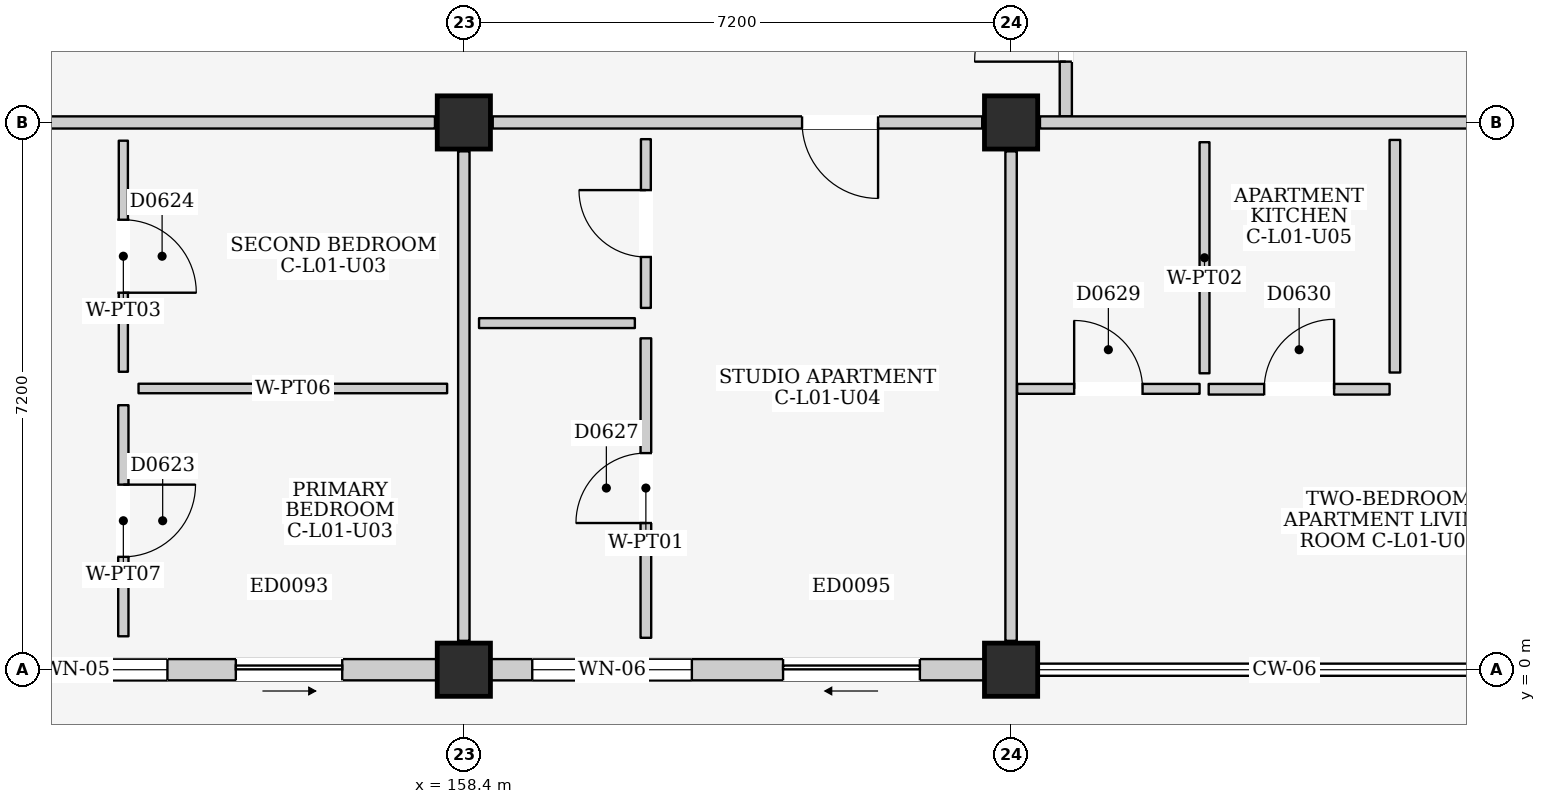
"""IFC4 building model, lengths in metres.
Left out: names, types, materials, properties, quantities, classifications, styles, units other than length and angle.
Written with IfcOpenShell. Run it as: python <this file> out.ifc"""

import sys

from ifc_helpers import new_model, si_unit, direction, frame, frame_2d, origin, origin_2d, place, context, subcontext, project, spatial, rectangle, extrude, element, fill, save


model = new_model("IFC4")
c1 = context("Model", 3, precision=1e-05, world=origin(), true_north=direction((0.0, 1.0)))
c2 = subcontext(c1, "Body", "Model", "MODEL_VIEW")
j1 = project(units=[si_unit("LENGTHUNIT", "METRE"), si_unit("PLANEANGLEUNIT", "RADIAN")], contexts=[c1])
p1 = place(None, origin())
s1 = spatial("IfcSite", under=j1, at=p1, CompositionType="ELEMENT")
p2 = place(p1, origin())
s2 = spatial("IfcBuilding", under=s1, at=p2, CompositionType="ELEMENT")
p3 = place(p2, frame((0.0, 0.0, 4.5)))
s3 = spatial("IfcBuildingStorey", under=s2, at=p3, CompositionType="ELEMENT", Elevation=4.5)
for number, where, z_axis, x_axis in (
    (1, (158.4, 0.0, 0.0), (0.0, 0.0, 1.0), (1.0, 0.0, 0.0)),
    (2, (158.4, 7.2, 0.0), (0.0, 0.0, 1.0), (1.0, 0.0, 0.0)),
    (3, (165.6, 0.0, 0.0), (0.0, 0.0, 1.0), (1.0, 0.0, 0.0)),
    (4, (165.6, 7.2, 0.0), (0.0, 0.0, 1.0), (1.0, 0.0, 0.0)),
):
    element("IfcColumn", number, at=place(p3, frame(where, z_axis=z_axis, x_axis=x_axis)), inside=s3, PredefinedType="COLUMN", context=c2, shape_type="SweptSolid", body=[
        extrude(rectangle(XDim=0.7, YDim=0.7, at=origin_2d()), origin(), (0.0, 0.0, 1.0), 4.5),
    ])
p4 = place(p3, frame((151.55, 0.0, 0.0), z_axis=(0.0, 0.0, 1.0), x_axis=(1.0, 0.0, 0.0)))
e5 = element("IfcWall", 5, at=p4, inside=s3, PredefinedType="ELEMENTEDWALL", context=c2, shape_type="SweptSolid", body=[
    extrude(rectangle(XDim=6.5, YDim=0.28, at=frame_2d((3.25, 0.0))), origin(), (0.0, 0.0, 1.0), 3.715),
])
p5 = place(p4, frame((3.85, 0.0, 0.0)))
e6 = element("IfcOpeningElement", 6, at=p5, cuts=e5, PredefinedType="OPENING", context=c2, shape_type="SweptSolid", body=[
    extrude(rectangle(XDim=1.4, YDim=2.1, at=frame_2d((0.7, 1.05))), frame((0.0, 0.155, 0.0), z_axis=(0.0, -1.0, 0.0), x_axis=(1.0, 0.0, 0.0)), (0.0, 0.0, 1.0), 0.31),
])
p6 = place(p4, frame((0.55, 0.0, 0.9)))
e7 = element("IfcOpeningElement", 7, at=p6, cuts=e5, PredefinedType="OPENING", context=c2, shape_type="SweptSolid", body=[
    extrude(rectangle(XDim=2.4, YDim=1.65, at=frame_2d((1.2, 0.825))), frame((0.0, 0.155, 0.0), z_axis=(0.0, -1.0, 0.0), x_axis=(1.0, 0.0, 0.0)), (0.0, 0.0, 1.0), 0.31),
])
p7 = place(p3, frame((158.75, 0.0, 0.0), z_axis=(0.0, 0.0, 1.0), x_axis=(1.0, 0.0, 0.0)))
e8 = element("IfcWall", 8, at=p7, inside=s3, PredefinedType="ELEMENTEDWALL", context=c2, shape_type="SweptSolid", body=[
    extrude(rectangle(XDim=6.5, YDim=0.28, at=frame_2d((3.25, 0.0))), origin(), (0.0, 0.0, 1.0), 3.715),
])
p8 = place(p7, frame((3.85, 0.0, 0.0)))
e9 = element("IfcOpeningElement", 9, at=p8, cuts=e8, PredefinedType="OPENING", context=c2, shape_type="SweptSolid", body=[
    extrude(rectangle(XDim=1.8, YDim=2.12, at=frame_2d((0.9, 1.06))), frame((0.0, 0.155, 0.0), z_axis=(0.0, -1.0, 0.0), x_axis=(1.0, 0.0, 0.0)), (0.0, 0.0, 1.0), 0.31),
])
p9 = place(p7, frame((0.55, 0.0, 0.9)))
e10 = element("IfcOpeningElement", 10, at=p9, cuts=e8, PredefinedType="OPENING", context=c2, shape_type="SweptSolid", body=[
    extrude(rectangle(XDim=2.1, YDim=1.65, at=frame_2d((1.05, 0.825))), frame((0.0, 0.155, 0.0), z_axis=(0.0, -1.0, 0.0), x_axis=(1.0, 0.0, 0.0)), (0.0, 0.0, 1.0), 0.31),
])
p10 = place(p3, frame((166.32, 7.28, 0.0), z_axis=(0.0, 0.0, 1.0), x_axis=(0.0, 1.0, 0.0)))
e11 = element("IfcWall", 11, at=p10, inside=s3, PredefinedType="PARTITIONING", context=c2, shape_type="SweptSolid", body=[
    extrude(rectangle(XDim=4.32, YDim=0.16, at=frame_2d((2.16, 0.0))), origin(), (0.0, 0.0, 1.0), 4.25),
])
p11 = place(p10, frame((0.72, 0.0, 0.0)))
e12 = element("IfcOpeningElement", 12, at=p11, cuts=e11, PredefinedType="OPENING", context=c2, shape_type="SweptSolid", body=[
    extrude(rectangle(XDim=1.2, YDim=2.2, at=frame_2d((0.6, 1.1))), frame((0.0, 0.095, 0.0), z_axis=(0.0, -1.0, 0.0), x_axis=(1.0, 0.0, 0.0)), (0.0, 0.0, 1.0), 0.19),
])
p12 = place(p3, frame((151.58, 7.2, 0.0), z_axis=(0.0, 0.0, 1.0), x_axis=(1.0, 0.0, 0.0)))
e13 = element("IfcWall", 13, at=p12, inside=s3, PredefinedType="PARTITIONING", context=c2, shape_type="SweptSolid", body=[
    extrude(rectangle(XDim=6.44, YDim=0.16, at=frame_2d((3.22, 0.0))), origin(), (0.0, 0.0, 1.0), 3.635),
])
p13 = place(p12, frame((0.18, 0.0, 0.0)))
e14 = element("IfcOpeningElement", 14, at=p13, cuts=e13, PredefinedType="OPENING", context=c2, shape_type="SweptSolid", body=[
    extrude(rectangle(XDim=1.0, YDim=2.15, at=frame_2d((0.5, 1.075))), frame((0.0, 0.095, 0.0), z_axis=(0.0, -1.0, 0.0), x_axis=(1.0, 0.0, 0.0)), (0.0, 0.0, 1.0), 0.19),
])
p14 = place(p3, frame((158.4, 0.38, 0.0), z_axis=(0.0, 0.0, 1.0), x_axis=(0.0, 1.0, 0.0)))
e15 = element("IfcWall", 15, at=p14, inside=s3, PredefinedType="PARTITIONING", context=c2, shape_type="SweptSolid", body=[
    extrude(rectangle(XDim=6.44, YDim=0.15, at=frame_2d((3.22, 0.0))), origin(), (0.0, 0.0, 1.0), 3.685),
])
p15 = place(p3, frame((153.92, 0.44, 0.0), z_axis=(0.0, 0.0, 1.0), x_axis=(0.0, 1.0, 0.0)))
e16 = element("IfcWall", 16, at=p15, inside=s3, PredefinedType="PARTITIONING", context=c2, shape_type="SweptSolid", body=[
    extrude(rectangle(XDim=3.04, YDim=0.135, at=frame_2d((1.52, 0.0))), origin(), (0.0, 0.0, 1.0), 4.25),
])
p16 = place(p15, frame((1.045, 0.0, 0.0)))
e17 = element("IfcOpeningElement", 17, at=p16, cuts=e16, PredefinedType="OPENING", context=c2, shape_type="SweptSolid", body=[
    extrude(rectangle(XDim=0.95, YDim=2.15, at=frame_2d((0.475, 1.075))), frame((0.0, 0.083, 0.0), z_axis=(0.0, -1.0, 0.0), x_axis=(1.0, 0.0, 0.0)), (0.0, 0.0, 1.0), 0.165),
])
p17 = place(p3, frame((154.12, 3.7, 0.0), z_axis=(0.0, 0.0, 1.0), x_axis=(1.0, 0.0, 0.0)))
e18 = element("IfcWall", 18, at=p17, inside=s3, PredefinedType="PARTITIONING", context=c2, shape_type="SweptSolid", body=[
    extrude(rectangle(XDim=4.06, YDim=0.125, at=frame_2d((2.03, 0.0))), origin(), (0.0, 0.0, 1.0), 4.25),
])
p18 = place(p3, frame((153.92, 3.92, 0.0), z_axis=(0.0, 0.0, 1.0), x_axis=(0.0, 1.0, 0.0)))
e19 = element("IfcWall", 19, at=p18, inside=s3, PredefinedType="PARTITIONING", context=c2, shape_type="SweptSolid", body=[
    extrude(rectangle(XDim=3.04, YDim=0.12, at=frame_2d((1.52, 0.0))), origin(), (0.0, 0.0, 1.0), 4.25),
])
p19 = place(p18, frame((1.04, 0.0, 0.0)))
e20 = element("IfcOpeningElement", 20, at=p19, cuts=e19, PredefinedType="OPENING", context=c2, shape_type="SweptSolid", body=[
    extrude(rectangle(XDim=0.96, YDim=2.15, at=frame_2d((0.48, 1.075))), frame((0.0, 0.075, 0.0), z_axis=(0.0, -1.0, 0.0), x_axis=(1.0, 0.0, 0.0)), (0.0, 0.0, 1.0), 0.15),
])
p20 = place(p3, frame((158.78, 7.2, 0.0), z_axis=(0.0, 0.0, 1.0), x_axis=(1.0, 0.0, 0.0)))
e21 = element("IfcWall", 21, at=p20, inside=s3, PredefinedType="PARTITIONING", context=c2, shape_type="SweptSolid", body=[
    extrude(rectangle(XDim=6.44, YDim=0.16, at=frame_2d((3.22, 0.0))), origin(), (0.0, 0.0, 1.0), 3.635),
])
p21 = place(p20, frame((4.07, 0.0, 0.0)))
e22 = element("IfcOpeningElement", 22, at=p21, cuts=e21, PredefinedType="OPENING", context=c2, shape_type="SweptSolid", body=[
    extrude(rectangle(XDim=1.0, YDim=2.15, at=frame_2d((0.5, 1.075))), frame((0.0, 0.095, 0.0), z_axis=(0.0, -1.0, 0.0), x_axis=(1.0, 0.0, 0.0)), (0.0, 0.0, 1.0), 0.19),
])
p22 = place(p3, frame((165.6, 0.38, 0.0), z_axis=(0.0, 0.0, 1.0), x_axis=(0.0, 1.0, 0.0)))
e23 = element("IfcWall", 23, at=p22, inside=s3, PredefinedType="PARTITIONING", context=c2, shape_type="SweptSolid", body=[
    extrude(rectangle(XDim=6.44, YDim=0.15, at=frame_2d((3.22, 0.0))), origin(), (0.0, 0.0, 1.0), 3.685),
])
p23 = place(p3, frame((158.6, 4.56, 0.0), z_axis=(0.0, 0.0, 1.0), x_axis=(1.0, 0.0, 0.0)))
e24 = element("IfcWall", 24, at=p23, inside=s3, PredefinedType="PARTITIONING", context=c2, shape_type="SweptSolid", body=[
    extrude(rectangle(XDim=2.05, YDim=0.13, at=frame_2d((1.025, 0.0))), origin(), (0.0, 0.0, 1.0), 4.25),
])
p24 = place(p3, frame((160.795, 4.76, 0.0), z_axis=(0.0, 0.0, 1.0), x_axis=(0.0, 1.0, 0.0)))
e25 = element("IfcWall", 25, at=p24, inside=s3, PredefinedType="PARTITIONING", context=c2, shape_type="SweptSolid", body=[
    extrude(rectangle(XDim=2.22, YDim=0.13, at=frame_2d((1.11, 0.0))), origin(), (0.0, 0.0, 1.0), 4.25),
])
p25 = place(p24, frame((0.67, 0.0, 0.0)))
e26 = element("IfcOpeningElement", 26, at=p25, cuts=e25, PredefinedType="OPENING", context=c2, shape_type="SweptSolid", body=[
    extrude(rectangle(XDim=0.88, YDim=2.1, at=frame_2d((0.44, 1.05))), frame((0.0, 0.08, 0.0), z_axis=(0.0, -1.0, 0.0), x_axis=(1.0, 0.0, 0.0)), (0.0, 0.0, 1.0), 0.16),
])
p26 = place(p3, frame((160.795, 0.42, 0.0), z_axis=(0.0, 0.0, 1.0), x_axis=(0.0, 1.0, 0.0)))
e27 = element("IfcWall", 27, at=p26, inside=s3, PredefinedType="PARTITIONING", context=c2, shape_type="SweptSolid", body=[
    extrude(rectangle(XDim=3.94, YDim=0.14, at=frame_2d((1.97, 0.0))), origin(), (0.0, 0.0, 1.0), 4.25),
])
p27 = place(p26, frame((1.51, 0.0, 0.0)))
e28 = element("IfcOpeningElement", 28, at=p27, cuts=e27, PredefinedType="OPENING", context=c2, shape_type="SweptSolid", body=[
    extrude(rectangle(XDim=0.92, YDim=2.1, at=frame_2d((0.46, 1.05))), frame((0.0, 0.085, 0.0), z_axis=(0.0, -1.0, 0.0), x_axis=(1.0, 0.0, 0.0)), (0.0, 0.0, 1.0), 0.17),
])
p28 = place(p3, frame((165.98, 7.2, 0.0), z_axis=(0.0, 0.0, 1.0), x_axis=(1.0, 0.0, 0.0)))
e29 = element("IfcWall", 29, at=p28, inside=s3, PredefinedType="PARTITIONING", context=c2, shape_type="SweptSolid", body=[
    extrude(rectangle(XDim=6.44, YDim=0.16, at=frame_2d((3.22, 0.0))), origin(), (0.0, 0.0, 1.0), 3.635),
])
p29 = place(p3, frame((165.68, 3.695, 0.0), z_axis=(0.0, 0.0, 1.0), x_axis=(1.0, 0.0, 0.0)))
e30 = element("IfcWall", 30, at=p29, inside=s3, PredefinedType="PARTITIONING", context=c2, shape_type="SweptSolid", body=[
    extrude(rectangle(XDim=2.4, YDim=0.13, at=frame_2d((1.2, 0.0))), origin(), (0.0, 0.0, 1.0), 4.25),
])
p30 = place(p29, frame((0.75, 0.0, 0.0)))
e31 = element("IfcOpeningElement", 31, at=p30, cuts=e30, PredefinedType="OPENING", context=c2, shape_type="SweptSolid", body=[
    extrude(rectangle(XDim=0.9, YDim=2.1, at=frame_2d((0.45, 1.05))), frame((0.0, 0.08, 0.0), z_axis=(0.0, -1.0, 0.0), x_axis=(1.0, 0.0, 0.0)), (0.0, 0.0, 1.0), 0.16),
])
p31 = place(p3, frame((168.145, 3.9, 0.0), z_axis=(0.0, 0.0, 1.0), x_axis=(0.0, 1.0, 0.0)))
e32 = element("IfcWall", 32, at=p31, inside=s3, PredefinedType="PARTITIONING", context=c2, shape_type="SweptSolid", body=[
    extrude(rectangle(XDim=3.04, YDim=0.13, at=frame_2d((1.52, 0.0))), origin(), (0.0, 0.0, 1.0), 4.25),
])
p32 = place(p3, frame((168.2, 3.69, 0.0), z_axis=(0.0, 0.0, 1.0), x_axis=(1.0, 0.0, 0.0)))
e33 = element("IfcWall", 33, at=p32, inside=s3, PredefinedType="PARTITIONING", context=c2, shape_type="SweptSolid", body=[
    extrude(rectangle(XDim=2.38, YDim=0.14, at=frame_2d((1.19, 0.0))), origin(), (0.0, 0.0, 1.0), 4.25),
])
p33 = place(p32, frame((0.73, 0.0, 0.0)))
e34 = element("IfcOpeningElement", 34, at=p33, cuts=e33, PredefinedType="OPENING", context=c2, shape_type="SweptSolid", body=[
    extrude(rectangle(XDim=0.92, YDim=2.1, at=frame_2d((0.46, 1.05))), frame((0.0, 0.085, 0.0), z_axis=(0.0, -1.0, 0.0), x_axis=(1.0, 0.0, 0.0)), (0.0, 0.0, 1.0), 0.17),
])
p34 = place(p3, frame((170.65, 3.91, 0.0), z_axis=(0.0, 0.0, 1.0), x_axis=(0.0, 1.0, 0.0)))
e35 = element("IfcWall", 35, at=p34, inside=s3, PredefinedType="PARTITIONING", context=c2, shape_type="SweptSolid", body=[
    extrude(rectangle(XDim=3.06, YDim=0.14, at=frame_2d((1.53, 0.0))), origin(), (0.0, 0.0, 1.0), 4.25),
])
p35 = place(p5, frame((1.4, 0.0, 0.0), z_axis=(0.0, 0.0, 1.0), x_axis=(-1.0, 0.0, 0.0)))
e36 = element("IfcDoor", 36, at=p35, inside=s3, OperationType="SLIDING_TO_RIGHT", PredefinedType="DOOR", context=c2, shape_type="SweptSolid", body=[
    extrude(rectangle(XDim=1.4, YDim=2.1, at=frame_2d((0.7, 1.05))), frame((0.0, 0.025, 0.0), z_axis=(0.0, -1.0, 0.0), x_axis=(1.0, 0.0, 0.0)), (0.0, 0.0, 1.0), 0.05),
])
fill(e6, e36)
p36 = place(p6, origin())
e37 = element("IfcWindow", 37, at=p36, inside=s3, PartitioningType="TRIPLE_PANEL_VERTICAL", PredefinedType="WINDOW", context=c2, shape_type="SweptSolid", body=[
    extrude(rectangle(XDim=2.4, YDim=1.65, at=frame_2d((1.2, 0.825))), frame((0.0, 0.03, 0.0), z_axis=(0.0, -1.0, 0.0), x_axis=(1.0, 0.0, 0.0)), (0.0, 0.0, 1.0), 0.06),
])
fill(e7, e37)
p37 = place(p8, frame((1.8, 0.0, 0.0), z_axis=(0.0, 0.0, 1.0), x_axis=(-1.0, 0.0, 0.0)))
e38 = element("IfcDoor", 38, at=p37, inside=s3, OperationType="SLIDING_TO_LEFT", PredefinedType="DOOR", context=c2, shape_type="SweptSolid", body=[
    extrude(rectangle(XDim=1.8, YDim=2.12, at=frame_2d((0.9, 1.06))), frame((0.0, 0.025, 0.0), z_axis=(0.0, -1.0, 0.0), x_axis=(1.0, 0.0, 0.0)), (0.0, 0.0, 1.0), 0.05),
])
fill(e9, e38)
p38 = place(p9, origin())
e39 = element("IfcWindow", 39, at=p38, inside=s3, PartitioningType="DOUBLE_PANEL_VERTICAL", PredefinedType="WINDOW", context=c2, shape_type="SweptSolid", body=[
    extrude(rectangle(XDim=2.1, YDim=1.65, at=frame_2d((1.05, 0.825))), frame((0.0, 0.03, 0.0), z_axis=(0.0, -1.0, 0.0), x_axis=(1.0, 0.0, 0.0)), (0.0, 0.0, 1.0), 0.06),
])
fill(e10, e39)
p39 = place(p11, origin())
e40 = element("IfcDoor", 40, at=p39, inside=s3, OperationType="SINGLE_SWING_LEFT", PredefinedType="DOOR", context=c2, shape_type="SweptSolid", body=[
    extrude(rectangle(XDim=1.2, YDim=2.2, at=frame_2d((0.6, 1.1))), frame((0.0, 0.025, 0.0), z_axis=(0.0, -1.0, 0.0), x_axis=(1.0, 0.0, 0.0)), (0.0, 0.0, 1.0), 0.05),
])
fill(e12, e40)
p40 = place(p16, frame((0.95, 0.0, 0.0), z_axis=(0.0, 0.0, 1.0), x_axis=(-1.0, 0.0, 0.0)))
e41 = element("IfcDoor", 41, at=p40, inside=s3, OperationType="SINGLE_SWING_LEFT", PredefinedType="DOOR", context=c2, shape_type="SweptSolid", body=[
    extrude(rectangle(XDim=0.95, YDim=2.15, at=frame_2d((0.475, 1.075))), frame((0.0, 0.025, 0.0), z_axis=(0.0, -1.0, 0.0), x_axis=(1.0, 0.0, 0.0)), (0.0, 0.0, 1.0), 0.05),
])
fill(e17, e41)
p41 = place(p19, frame((0.96, 0.0, 0.0), z_axis=(0.0, 0.0, 1.0), x_axis=(-1.0, 0.0, 0.0)))
e42 = element("IfcDoor", 42, at=p41, inside=s3, OperationType="SINGLE_SWING_RIGHT", PredefinedType="DOOR", context=c2, shape_type="SweptSolid", body=[
    extrude(rectangle(XDim=0.96, YDim=2.15, at=frame_2d((0.48, 1.075))), frame((0.0, 0.025, 0.0), z_axis=(0.0, -1.0, 0.0), x_axis=(1.0, 0.0, 0.0)), (0.0, 0.0, 1.0), 0.05),
])
fill(e20, e42)
p42 = place(p21, frame((1.0, 0.0, 0.0), z_axis=(0.0, 0.0, 1.0), x_axis=(-1.0, 0.0, 0.0)))
e43 = element("IfcDoor", 43, at=p42, inside=s3, OperationType="SINGLE_SWING_LEFT", PredefinedType="DOOR", context=c2, shape_type="SweptSolid", body=[
    extrude(rectangle(XDim=1.0, YDim=2.15, at=frame_2d((0.5, 1.075))), frame((0.0, 0.025, 0.0), z_axis=(0.0, -1.0, 0.0), x_axis=(1.0, 0.0, 0.0)), (0.0, 0.0, 1.0), 0.05),
])
fill(e22, e43)
p43 = place(p25, origin())
e44 = element("IfcDoor", 44, at=p43, inside=s3, OperationType="SINGLE_SWING_RIGHT", PredefinedType="DOOR", context=c2, shape_type="SweptSolid", body=[
    extrude(rectangle(XDim=0.88, YDim=2.1, at=frame_2d((0.44, 1.05))), frame((0.0, 0.025, 0.0), z_axis=(0.0, -1.0, 0.0), x_axis=(1.0, 0.0, 0.0)), (0.0, 0.0, 1.0), 0.05),
])
fill(e26, e44)
p44 = place(p27, origin())
e45 = element("IfcDoor", 45, at=p44, inside=s3, OperationType="SINGLE_SWING_LEFT", PredefinedType="DOOR", context=c2, shape_type="SweptSolid", body=[
    extrude(rectangle(XDim=0.92, YDim=2.1, at=frame_2d((0.46, 1.05))), frame((0.0, 0.025, 0.0), z_axis=(0.0, -1.0, 0.0), x_axis=(1.0, 0.0, 0.0)), (0.0, 0.0, 1.0), 0.05),
])
fill(e28, e45)
p45 = place(p30, origin())
e46 = element("IfcDoor", 46, at=p45, inside=s3, OperationType="SINGLE_SWING_LEFT", PredefinedType="DOOR", context=c2, shape_type="SweptSolid", body=[
    extrude(rectangle(XDim=0.9, YDim=2.1, at=frame_2d((0.45, 1.05))), frame((0.0, 0.025, 0.0), z_axis=(0.0, -1.0, 0.0), x_axis=(1.0, 0.0, 0.0)), (0.0, 0.0, 1.0), 0.05),
])
fill(e31, e46)
p46 = place(p33, origin())
e47 = element("IfcDoor", 47, at=p46, inside=s3, OperationType="SINGLE_SWING_RIGHT", PredefinedType="DOOR", context=c2, shape_type="SweptSolid", body=[
    extrude(rectangle(XDim=0.92, YDim=2.1, at=frame_2d((0.46, 1.05))), frame((0.0, 0.025, 0.0), z_axis=(0.0, -1.0, 0.0), x_axis=(1.0, 0.0, 0.0)), (0.0, 0.0, 1.0), 0.05),
])
fill(e34, e47)
save(model, sys.argv[1])
